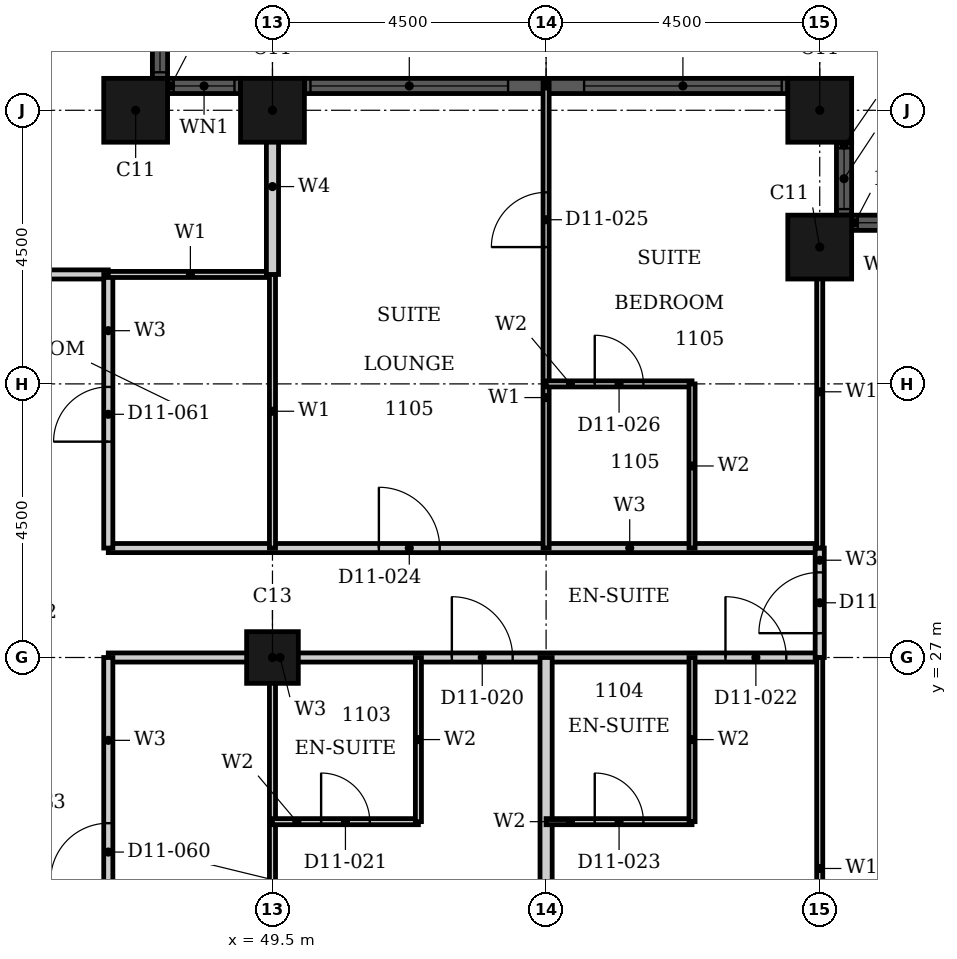
"""IFC4 building model, lengths in metres.
Left out: names, types, materials, properties, quantities, classifications, styles, units other than length and angle.
Written with IfcOpenShell. Run it as: python <this file> out.ifc"""

import sys

from ifc_helpers import new_model, si_unit, direction, frame, frame_2d, origin, origin_2d, place, context, subcontext, project, spatial, rectangle, hollow_rectangle, extrude, element, fill, save


model = new_model("IFC4")
c1 = context("Model", 3, precision=1e-05, world=origin(), true_north=direction((0.0, 1.0)))
c2 = subcontext(c1, "Body", "Model", "MODEL_VIEW")
j1 = project(units=[si_unit("LENGTHUNIT", "METRE"), si_unit("PLANEANGLEUNIT", "RADIAN")], contexts=[c1])
p1 = place(None, origin())
s1 = spatial("IfcSite", under=j1, at=p1, CompositionType="ELEMENT")
p2 = place(p1, origin())
s2 = spatial("IfcBuilding", under=s1, at=p2, CompositionType="ELEMENT")
p3 = place(p2, frame((0.0, 0.0, 52.8)))
s3 = spatial("IfcBuildingStorey", under=s2, at=p3, CompositionType="ELEMENT", Elevation=52.8)
for number, where, z_axis, x_axis in (
    (1, (58.5, 33.75, 0.0), (0.0, 0.0, 1.0), (1.0, 0.0, 0.0)),
    (2, (58.5, 36.0, 0.0), (0.0, 0.0, 1.0), (1.0, 0.0, 0.0)),
    (3, (49.5, 36.0, 0.0), (0.0, 0.0, 1.0), (1.0, 0.0, 0.0)),
    (4, (47.25, 36.0, 0.0), (0.0, 0.0, 1.0), (1.0, 0.0, 0.0)),
):
    element("IfcColumn", number, at=place(p3, frame(where, z_axis=z_axis, x_axis=x_axis)), inside=s3, PredefinedType="COLUMN", context=c2, shape_type="SweptSolid", body=[
        extrude(hollow_rectangle(XDim=1.05, YDim=1.05, WallThickness=0.034, at=origin_2d()), origin(), (0.0, 0.0, 1.0), 3.6),
    ])
p4 = place(p3, frame((49.5, 27.0, 0.0), z_axis=(0.0, 0.0, 1.0), x_axis=(1.0, 0.0, 0.0)))
e5 = element("IfcColumn", 5, at=p4, inside=s3, PredefinedType="COLUMN", context=c2, shape_type="SweptSolid", body=[
    extrude(hollow_rectangle(XDim=0.85, YDim=0.85, WallThickness=0.026, at=origin_2d()), origin(), (0.0, 0.0, 1.0), 3.6),
])
p5 = place(p3, frame((60.225, 34.15, 0.0), z_axis=(0.0, 0.0, 1.0), x_axis=(-1.0, 0.0, 0.0)))
e6 = element("IfcWall", 6, at=p5, inside=s3, PredefinedType="SOLIDWALL", context=c2, shape_type="SweptSolid", body=[
    extrude(rectangle(XDim=1.2, YDim=0.25, at=frame_2d((0.6, 0.0))), origin(), (0.0, 0.0, 1.0), 3.6),
])
p6 = place(p5, frame((0.1, 0.0, 0.9)))
e7 = element("IfcOpeningElement", 7, at=p6, cuts=e6, PredefinedType="OPENING", context=c2, shape_type="SweptSolid", body=[
    extrude(rectangle(XDim=1.0, YDim=2.08, at=frame_2d((0.5, 1.04))), frame((0.0, 0.135, 0.0), z_axis=(0.0, -1.0, 0.0), x_axis=(1.0, 0.0, 0.0)), (0.0, 0.0, 1.0), 0.27),
])
p7 = place(p3, frame((58.9, 34.275, 0.0), z_axis=(0.0, 0.0, 1.0), x_axis=(0.0, 1.0, 0.0)))
e8 = element("IfcWall", 8, at=p7, inside=s3, PredefinedType="SOLIDWALL", context=c2, shape_type="SweptSolid", body=[
    extrude(rectangle(XDim=1.2, YDim=0.25, at=frame_2d((0.6, 0.0))), origin(), (0.0, 0.0, 1.0), 3.6),
])
p8 = place(p7, frame((0.1, 0.0, 0.9)))
e9 = element("IfcOpeningElement", 9, at=p8, cuts=e8, PredefinedType="OPENING", context=c2, shape_type="SweptSolid", body=[
    extrude(rectangle(XDim=1.0, YDim=2.08, at=frame_2d((0.5, 1.04))), frame((0.0, 0.135, 0.0), z_axis=(0.0, -1.0, 0.0), x_axis=(1.0, 0.0, 0.0)), (0.0, 0.0, 1.0), 0.27),
])
p9 = place(p3, frame((57.975, 36.4, 0.0), z_axis=(0.0, 0.0, 1.0), x_axis=(-1.0, 0.0, 0.0)))
e10 = element("IfcWall", 10, at=p9, inside=s3, PredefinedType="SOLIDWALL", context=c2, shape_type="SweptSolid", body=[
    extrude(rectangle(XDim=7.95, YDim=0.25, at=frame_2d((3.975, 0.0))), origin(), (0.0, 0.0, 1.0), 3.6),
])
p10 = place(p9, frame((0.1, 0.0, 0.9)))
e11 = element("IfcOpeningElement", 11, at=p10, cuts=e10, PredefinedType="OPENING", context=c2, shape_type="SweptSolid", body=[
    extrude(rectangle(XDim=3.25, YDim=2.08, at=frame_2d((1.625, 1.04))), frame((0.0, 0.135, 0.0), z_axis=(0.0, -1.0, 0.0), x_axis=(1.0, 0.0, 0.0)), (0.0, 0.0, 1.0), 0.27),
])
p11 = place(p9, frame((4.6, 0.0, 0.9)))
e12 = element("IfcOpeningElement", 12, at=p11, cuts=e10, PredefinedType="OPENING", context=c2, shape_type="SweptSolid", body=[
    extrude(rectangle(XDim=3.25, YDim=2.08, at=frame_2d((1.625, 1.04))), frame((0.0, 0.135, 0.0), z_axis=(0.0, -1.0, 0.0), x_axis=(1.0, 0.0, 0.0)), (0.0, 0.0, 1.0), 0.27),
])
p12 = place(p3, frame((48.975, 36.4, 0.0), z_axis=(0.0, 0.0, 1.0), x_axis=(-1.0, 0.0, 0.0)))
e13 = element("IfcWall", 13, at=p12, inside=s3, PredefinedType="SOLIDWALL", context=c2, shape_type="SweptSolid", body=[
    extrude(rectangle(XDim=1.2, YDim=0.25, at=frame_2d((0.6, 0.0))), origin(), (0.0, 0.0, 1.0), 3.6),
])
p13 = place(p12, frame((0.1, 0.0, 0.9)))
e14 = element("IfcOpeningElement", 14, at=p13, cuts=e13, PredefinedType="OPENING", context=c2, shape_type="SweptSolid", body=[
    extrude(rectangle(XDim=1.0, YDim=2.08, at=frame_2d((0.5, 1.04))), frame((0.0, 0.135, 0.0), z_axis=(0.0, -1.0, 0.0), x_axis=(1.0, 0.0, 0.0)), (0.0, 0.0, 1.0), 0.27),
])
p14 = place(p3, frame((47.65, 36.525, 0.0), z_axis=(0.0, 0.0, 1.0), x_axis=(0.0, 1.0, 0.0)))
e15 = element("IfcWall", 15, at=p14, inside=s3, PredefinedType="SOLIDWALL", context=c2, shape_type="SweptSolid", body=[
    extrude(rectangle(XDim=1.2, YDim=0.25, at=frame_2d((0.6, 0.0))), origin(), (0.0, 0.0, 1.0), 3.6),
])
p15 = place(p14, frame((0.1, 0.0, 0.9)))
e16 = element("IfcOpeningElement", 16, at=p15, cuts=e15, PredefinedType="OPENING", context=c2, shape_type="SweptSolid", body=[
    extrude(rectangle(XDim=1.0, YDim=2.08, at=frame_2d((0.5, 1.04))), frame((0.0, 0.135, 0.0), z_axis=(0.0, -1.0, 0.0), x_axis=(1.0, 0.0, 0.0)), (0.0, 0.0, 1.0), 0.27),
])
p16 = place(p3, frame((46.8, 27.0, 0.0), z_axis=(0.0, 0.0, 1.0), x_axis=(1.0, 0.0, 0.0)))
e17 = element("IfcWall", 17, at=p16, inside=s3, PredefinedType="PARTITIONING", context=c2, shape_type="SweptSolid", body=[
    extrude(rectangle(XDim=11.7, YDim=0.15, at=frame_2d((5.85, 0.0))), origin(), (0.0, 0.0, 1.0), 2.58),
])
p17 = place(p16, frame((5.65, 0.0, 0.0)))
e18 = element("IfcOpeningElement", 18, at=p17, cuts=e17, PredefinedType="OPENING", context=c2, shape_type="SweptSolid", body=[
    extrude(rectangle(XDim=1.0, YDim=2.1, at=frame_2d((0.5, 1.05))), frame((0.0, 0.085, 0.0), z_axis=(0.0, -1.0, 0.0), x_axis=(1.0, 0.0, 0.0)), (0.0, 0.0, 1.0), 0.17),
])
p18 = place(p16, frame((10.15, 0.0, 0.0)))
e19 = element("IfcOpeningElement", 19, at=p18, cuts=e17, PredefinedType="OPENING", context=c2, shape_type="SweptSolid", body=[
    extrude(rectangle(XDim=1.0, YDim=2.1, at=frame_2d((0.5, 1.05))), frame((0.0, 0.085, 0.0), z_axis=(0.0, -1.0, 0.0), x_axis=(1.0, 0.0, 0.0)), (0.0, 0.0, 1.0), 0.17),
])
p19 = place(p3, frame((46.8, 28.8, 0.0), z_axis=(0.0, 0.0, 1.0), x_axis=(1.0, 0.0, 0.0)))
e20 = element("IfcWall", 20, at=p19, inside=s3, PredefinedType="PARTITIONING", context=c2, shape_type="SweptSolid", body=[
    extrude(rectangle(XDim=11.7, YDim=0.15, at=frame_2d((5.85, 0.0))), origin(), (0.0, 0.0, 1.0), 3.3),
])
p20 = place(p19, frame((4.45, 0.0, 0.0)))
e21 = element("IfcOpeningElement", 21, at=p20, cuts=e20, PredefinedType="OPENING", context=c2, shape_type="SweptSolid", body=[
    extrude(rectangle(XDim=1.0, YDim=2.1, at=frame_2d((0.5, 1.05))), frame((0.0, 0.085, 0.0), z_axis=(0.0, -1.0, 0.0), x_axis=(1.0, 0.0, 0.0)), (0.0, 0.0, 1.0), 0.17),
])
p21 = place(p3, frame((33.3, 33.3, 0.0), z_axis=(0.0, 0.0, 1.0), x_axis=(1.0, 0.0, 0.0)))
e22 = element("IfcWall", 22, at=p21, inside=s3, PredefinedType="PARTITIONING", context=c2, shape_type="SweptSolid", body=[
    extrude(rectangle(XDim=13.5, YDim=0.15, at=frame_2d((6.75, 0.0))), origin(), (0.0, 0.0, 1.0), 3.3),
])
p22 = place(p21, frame((10.15, 0.0, 0.0)))
e23 = element("IfcOpeningElement", 23, at=p22, cuts=e22, PredefinedType="OPENING", context=c2, shape_type="SweptSolid", body=[
    extrude(rectangle(XDim=1.0, YDim=2.1, at=frame_2d((0.5, 1.05))), frame((0.0, 0.085, 0.0), z_axis=(0.0, -1.0, 0.0), x_axis=(1.0, 0.0, 0.0)), (0.0, 0.0, 1.0), 0.17),
])
p23 = place(p21, frame((3.15, 0.0, 0.0)))
e24 = element("IfcOpeningElement", 24, at=p23, cuts=e22, PredefinedType="OPENING", context=c2, shape_type="SweptSolid", body=[
    extrude(rectangle(XDim=0.9, YDim=2.1, at=frame_2d((0.45, 1.05))), frame((0.0, 0.085, 0.0), z_axis=(0.0, -1.0, 0.0), x_axis=(1.0, 0.0, 0.0)), (0.0, 0.0, 1.0), 0.17),
])
p24 = place(p3, frame((46.8, 28.8, 0.0), z_axis=(0.0, 0.0, 1.0), x_axis=(0.0, 1.0, 0.0)))
e25 = element("IfcWall", 25, at=p24, inside=s3, PredefinedType="PARTITIONING", context=c2, shape_type="SweptSolid", body=[
    extrude(rectangle(XDim=4.5, YDim=0.15, at=frame_2d((2.25, 0.0))), origin(), (0.0, 0.0, 1.0), 3.3),
])
p25 = place(p24, frame((1.75, 0.0, 0.0)))
e26 = element("IfcOpeningElement", 26, at=p25, cuts=e25, PredefinedType="OPENING", context=c2, shape_type="SweptSolid", body=[
    extrude(rectangle(XDim=0.9, YDim=2.1, at=frame_2d((0.45, 1.05))), frame((0.0, 0.085, 0.0), z_axis=(0.0, -1.0, 0.0), x_axis=(1.0, 0.0, 0.0)), (0.0, 0.0, 1.0), 0.17),
])
p26 = place(p3, frame((46.8, 20.7, 0.0), z_axis=(0.0, 0.0, 1.0), x_axis=(0.0, 1.0, 0.0)))
e27 = element("IfcWall", 27, at=p26, inside=s3, PredefinedType="PARTITIONING", context=c2, shape_type="SweptSolid", body=[
    extrude(rectangle(XDim=6.3, YDim=0.15, at=frame_2d((3.15, 0.0))), origin(), (0.0, 0.0, 1.0), 3.3),
])
p27 = place(p26, frame((2.625, 0.0, 0.0)))
e28 = element("IfcOpeningElement", 28, at=p27, cuts=e27, PredefinedType="OPENING", context=c2, shape_type="SweptSolid", body=[
    extrude(rectangle(XDim=0.95, YDim=2.1, at=frame_2d((0.475, 1.05))), frame((0.0, 0.085, 0.0), z_axis=(0.0, -1.0, 0.0), x_axis=(1.0, 0.0, 0.0)), (0.0, 0.0, 1.0), 0.17),
])
p28 = place(p3, frame((58.5, 27.0, 0.0), z_axis=(0.0, 0.0, 1.0), x_axis=(0.0, 1.0, 0.0)))
e29 = element("IfcWall", 29, at=p28, inside=s3, PredefinedType="PARTITIONING", context=c2, shape_type="SweptSolid", body=[
    extrude(rectangle(XDim=1.8, YDim=0.15, at=frame_2d((0.9, 0.0))), origin(), (0.0, 0.0, 1.0), 3.3),
])
p29 = place(p28, frame((0.4, 0.0, 0.0)))
e30 = element("IfcOpeningElement", 30, at=p29, cuts=e29, PredefinedType="OPENING", context=c2, shape_type="SweptSolid", body=[
    extrude(rectangle(XDim=1.0, YDim=2.1, at=frame_2d((0.5, 1.05))), frame((0.0, 0.085, 0.0), z_axis=(0.0, -1.0, 0.0), x_axis=(1.0, 0.0, 0.0)), (0.0, 0.0, 1.0), 0.17),
])
p30 = place(p3, frame((46.8, 33.3, 0.0), z_axis=(0.0, 0.0, 1.0), x_axis=(1.0, 0.0, 0.0)))
e31 = element("IfcWall", 31, at=p30, inside=s3, PredefinedType="PARTITIONING", context=c2, shape_type="SweptSolid", body=[
    extrude(rectangle(XDim=2.7, YDim=0.1, at=frame_2d((1.35, 0.0))), origin(), (0.0, 0.0, 1.0), 3.3),
])
p31 = place(p3, frame((49.5, 17.81, 0.0), z_axis=(0.0, 0.0, 1.0), x_axis=(0.0, 1.0, 0.0)))
e32 = element("IfcWall", 32, at=p31, inside=s3, PredefinedType="PARTITIONING", context=c2, shape_type="SweptSolid", body=[
    extrude(rectangle(XDim=9.19, YDim=0.1, at=frame_2d((4.595, 0.0))), origin(), (0.0, 0.0, 1.0), 2.38),
])
p32 = place(p3, frame((49.5, 28.8, 0.0), z_axis=(0.0, 0.0, 1.0), x_axis=(0.0, 1.0, 0.0)))
e33 = element("IfcWall", 33, at=p32, inside=s3, PredefinedType="PARTITIONING", context=c2, shape_type="SweptSolid", body=[
    extrude(rectangle(XDim=4.5, YDim=0.1, at=frame_2d((2.25, 0.0))), origin(), (0.0, 0.0, 1.0), 2.38),
])
p33 = place(p3, frame((54.0, 28.8, 0.0), z_axis=(0.0, 0.0, 1.0), x_axis=(0.0, 1.0, 0.0)))
e34 = element("IfcWall", 34, at=p33, inside=s3, PredefinedType="PARTITIONING", context=c2, shape_type="SweptSolid", body=[
    extrude(rectangle(XDim=7.665, YDim=0.1, at=frame_2d((3.833, 0.0))), origin(), (0.0, 0.0, 1.0), 3.3),
])
p34 = place(p33, frame((4.95, 0.0, 0.0)))
e35 = element("IfcOpeningElement", 35, at=p34, cuts=e34, PredefinedType="OPENING", context=c2, shape_type="SweptSolid", body=[
    extrude(rectangle(XDim=0.9, YDim=2.1, at=frame_2d((0.45, 1.05))), frame((0.0, 0.06, 0.0), z_axis=(0.0, -1.0, 0.0), x_axis=(1.0, 0.0, 0.0)), (0.0, 0.0, 1.0), 0.12),
])
p35 = place(p3, frame((58.5, 20.06, 0.0), z_axis=(0.0, 0.0, 1.0), x_axis=(0.0, 1.0, 0.0)))
e36 = element("IfcWall", 36, at=p35, inside=s3, PredefinedType="PARTITIONING", context=c2, shape_type="SweptSolid", body=[
    extrude(rectangle(XDim=6.94, YDim=0.1, at=frame_2d((3.47, 0.0))), origin(), (0.0, 0.0, 1.0), 3.3),
])
p36 = place(p3, frame((58.5, 28.8, 0.0), z_axis=(0.0, 0.0, 1.0), x_axis=(0.0, 1.0, 0.0)))
e37 = element("IfcWall", 37, at=p36, inside=s3, PredefinedType="PARTITIONING", context=c2, shape_type="SweptSolid", body=[
    extrude(rectangle(XDim=5.14, YDim=0.1, at=frame_2d((2.57, 0.0))), origin(), (0.0, 0.0, 1.0), 3.3),
])
p37 = place(p3, frame((49.5, 33.3, 0.0), z_axis=(0.0, 0.0, 1.0), x_axis=(0.0, 1.0, 0.0)))
e38 = element("IfcWall", 38, at=p37, inside=s3, PredefinedType="PARTITIONING", context=c2, shape_type="SweptSolid", body=[
    extrude(rectangle(XDim=2.89, YDim=0.2, at=frame_2d((1.445, 0.0))), origin(), (0.0, 0.0, 1.0), 2.38),
])
p38 = place(p3, frame((54.0, 17.535, 0.0), z_axis=(0.0, 0.0, 1.0), x_axis=(0.0, 1.0, 0.0)))
e39 = element("IfcWall", 39, at=p38, inside=s3, PredefinedType="PARTITIONING", context=c2, shape_type="SweptSolid", body=[
    extrude(rectangle(XDim=9.465, YDim=0.2, at=frame_2d((4.732, 0.0))), origin(), (0.0, 0.0, 1.0), 3.3),
])
p39 = place(p3, frame((49.5, 24.3, 0.0), z_axis=(0.0, 0.0, 1.0), x_axis=(1.0, 0.0, 0.0)))
e40 = element("IfcWall", 40, at=p39, inside=s3, PredefinedType="PARTITIONING", context=c2, shape_type="SweptSolid", body=[
    extrude(rectangle(XDim=2.4, YDim=0.1, at=frame_2d((1.2, 0.0))), origin(), (0.0, 0.0, 1.0), 3.3),
])
p40 = place(p39, frame((0.8, 0.0, 0.0)))
e41 = element("IfcOpeningElement", 41, at=p40, cuts=e40, PredefinedType="OPENING", context=c2, shape_type="SweptSolid", body=[
    extrude(rectangle(XDim=0.8, YDim=2.1, at=frame_2d((0.4, 1.05))), frame((0.0, 0.06, 0.0), z_axis=(0.0, -1.0, 0.0), x_axis=(1.0, 0.0, 0.0)), (0.0, 0.0, 1.0), 0.12),
])
p41 = place(p3, frame((54.0, 24.3, 0.0), z_axis=(0.0, 0.0, 1.0), x_axis=(1.0, 0.0, 0.0)))
e42 = element("IfcWall", 42, at=p41, inside=s3, PredefinedType="PARTITIONING", context=c2, shape_type="SweptSolid", body=[
    extrude(rectangle(XDim=2.4, YDim=0.1, at=frame_2d((1.2, 0.0))), origin(), (0.0, 0.0, 1.0), 3.3),
])
p42 = place(p41, frame((0.8, 0.0, 0.0)))
e43 = element("IfcOpeningElement", 43, at=p42, cuts=e42, PredefinedType="OPENING", context=c2, shape_type="SweptSolid", body=[
    extrude(rectangle(XDim=0.8, YDim=2.1, at=frame_2d((0.4, 1.05))), frame((0.0, 0.06, 0.0), z_axis=(0.0, -1.0, 0.0), x_axis=(1.0, 0.0, 0.0)), (0.0, 0.0, 1.0), 0.12),
])
p43 = place(p3, frame((54.0, 31.5, 0.0), z_axis=(0.0, 0.0, 1.0), x_axis=(1.0, 0.0, 0.0)))
e44 = element("IfcWall", 44, at=p43, inside=s3, PredefinedType="PARTITIONING", context=c2, shape_type="SweptSolid", body=[
    extrude(rectangle(XDim=2.4, YDim=0.1, at=frame_2d((1.2, 0.0))), origin(), (0.0, 0.0, 1.0), 2.58),
])
p44 = place(p43, frame((0.8, 0.0, 0.0)))
e45 = element("IfcOpeningElement", 45, at=p44, cuts=e44, PredefinedType="OPENING", context=c2, shape_type="SweptSolid", body=[
    extrude(rectangle(XDim=0.8, YDim=2.1, at=frame_2d((0.4, 1.05))), frame((0.0, 0.06, 0.0), z_axis=(0.0, -1.0, 0.0), x_axis=(1.0, 0.0, 0.0)), (0.0, 0.0, 1.0), 0.12),
])
for number, where, z_axis, x_axis in (
    (46, (51.9, 24.3, 0.0), (0.0, 0.0, 1.0), (0.0, 1.0, 0.0)),
    (47, (56.4, 24.3, 0.0), (0.0, 0.0, 1.0), (0.0, 1.0, 0.0)),
    (48, (56.4, 28.8, 0.0), (0.0, 0.0, 1.0), (0.0, 1.0, 0.0)),
):
    element("IfcWall", number, at=place(p3, frame(where, z_axis=z_axis, x_axis=x_axis)), inside=s3, PredefinedType="PARTITIONING", context=c2, shape_type="SweptSolid", body=[
        extrude(rectangle(XDim=2.7, YDim=0.1, at=frame_2d((1.35, 0.0))), origin(), (0.0, 0.0, 1.0), 3.3),
    ])
p45 = place(p6, origin())
e49 = element("IfcWindow", 49, at=p45, inside=s3, PartitioningType="SINGLE_PANEL", PredefinedType="WINDOW", context=c2, shape_type="SweptSolid", body=[
    extrude(rectangle(XDim=1.0, YDim=2.08, at=frame_2d((0.5, 1.04))), frame((0.0, 0.03, 0.0), z_axis=(0.0, -1.0, 0.0), x_axis=(1.0, 0.0, 0.0)), (0.0, 0.0, 1.0), 0.06),
])
fill(e7, e49)
p46 = place(p8, origin())
e50 = element("IfcWindow", 50, at=p46, inside=s3, PartitioningType="SINGLE_PANEL", PredefinedType="WINDOW", context=c2, shape_type="SweptSolid", body=[
    extrude(rectangle(XDim=1.0, YDim=2.08, at=frame_2d((0.5, 1.04))), frame((0.0, 0.03, 0.0), z_axis=(0.0, -1.0, 0.0), x_axis=(1.0, 0.0, 0.0)), (0.0, 0.0, 1.0), 0.06),
])
fill(e9, e50)
p47 = place(p10, origin())
e51 = element("IfcWindow", 51, at=p47, inside=s3, PartitioningType="SINGLE_PANEL", PredefinedType="WINDOW", context=c2, shape_type="SweptSolid", body=[
    extrude(rectangle(XDim=3.25, YDim=2.08, at=frame_2d((1.625, 1.04))), frame((0.0, 0.03, 0.0), z_axis=(0.0, -1.0, 0.0), x_axis=(1.0, 0.0, 0.0)), (0.0, 0.0, 1.0), 0.06),
])
fill(e11, e51)
p48 = place(p11, origin())
e52 = element("IfcWindow", 52, at=p48, inside=s3, PartitioningType="SINGLE_PANEL", PredefinedType="WINDOW", context=c2, shape_type="SweptSolid", body=[
    extrude(rectangle(XDim=3.25, YDim=2.08, at=frame_2d((1.625, 1.04))), frame((0.0, 0.03, 0.0), z_axis=(0.0, -1.0, 0.0), x_axis=(1.0, 0.0, 0.0)), (0.0, 0.0, 1.0), 0.06),
])
fill(e12, e52)
p49 = place(p13, origin())
e53 = element("IfcWindow", 53, at=p49, inside=s3, PartitioningType="SINGLE_PANEL", PredefinedType="WINDOW", context=c2, shape_type="SweptSolid", body=[
    extrude(rectangle(XDim=1.0, YDim=2.08, at=frame_2d((0.5, 1.04))), frame((0.0, 0.03, 0.0), z_axis=(0.0, -1.0, 0.0), x_axis=(1.0, 0.0, 0.0)), (0.0, 0.0, 1.0), 0.06),
])
fill(e14, e53)
p50 = place(p15, origin())
e54 = element("IfcWindow", 54, at=p50, inside=s3, PartitioningType="SINGLE_PANEL", PredefinedType="WINDOW", context=c2, shape_type="SweptSolid", body=[
    extrude(rectangle(XDim=1.0, YDim=2.08, at=frame_2d((0.5, 1.04))), frame((0.0, 0.03, 0.0), z_axis=(0.0, -1.0, 0.0), x_axis=(1.0, 0.0, 0.0)), (0.0, 0.0, 1.0), 0.06),
])
fill(e16, e54)
p51 = place(p17, origin())
e55 = element("IfcDoor", 55, at=p51, inside=s3, OperationType="SINGLE_SWING_RIGHT", PredefinedType="DOOR", context=c2, shape_type="SweptSolid", body=[
    extrude(rectangle(XDim=1.0, YDim=2.1, at=frame_2d((0.5, 1.05))), frame((0.0, 0.025, 0.0), z_axis=(0.0, -1.0, 0.0), x_axis=(1.0, 0.0, 0.0)), (0.0, 0.0, 1.0), 0.05),
])
fill(e18, e55)
p52 = place(p40, origin())
e56 = element("IfcDoor", 56, at=p52, inside=s3, OperationType="SINGLE_SWING_RIGHT", PredefinedType="DOOR", context=c2, shape_type="SweptSolid", body=[
    extrude(rectangle(XDim=0.8, YDim=2.1, at=frame_2d((0.4, 1.05))), frame((0.0, 0.025, 0.0), z_axis=(0.0, -1.0, 0.0), x_axis=(1.0, 0.0, 0.0)), (0.0, 0.0, 1.0), 0.05),
])
fill(e41, e56)
p53 = place(p18, origin())
e57 = element("IfcDoor", 57, at=p53, inside=s3, OperationType="SINGLE_SWING_RIGHT", PredefinedType="DOOR", context=c2, shape_type="SweptSolid", body=[
    extrude(rectangle(XDim=1.0, YDim=2.1, at=frame_2d((0.5, 1.05))), frame((0.0, 0.025, 0.0), z_axis=(0.0, -1.0, 0.0), x_axis=(1.0, 0.0, 0.0)), (0.0, 0.0, 1.0), 0.05),
])
fill(e19, e57)
p54 = place(p42, origin())
e58 = element("IfcDoor", 58, at=p54, inside=s3, OperationType="SINGLE_SWING_LEFT", PredefinedType="DOOR", context=c2, shape_type="SweptSolid", body=[
    extrude(rectangle(XDim=0.8, YDim=2.1, at=frame_2d((0.4, 1.05))), frame((0.0, 0.025, 0.0), z_axis=(0.0, -1.0, 0.0), x_axis=(1.0, 0.0, 0.0)), (0.0, 0.0, 1.0), 0.05),
])
fill(e43, e58)
p55 = place(p20, origin())
e59 = element("IfcDoor", 59, at=p55, inside=s3, OperationType="SINGLE_SWING_LEFT", PredefinedType="DOOR", context=c2, shape_type="SweptSolid", body=[
    extrude(rectangle(XDim=1.0, YDim=2.1, at=frame_2d((0.5, 1.05))), frame((0.0, 0.025, 0.0), z_axis=(0.0, -1.0, 0.0), x_axis=(1.0, 0.0, 0.0)), (0.0, 0.0, 1.0), 0.05),
])
fill(e21, e59)
p56 = place(p34, origin())
e60 = element("IfcDoor", 60, at=p56, inside=s3, OperationType="SINGLE_SWING_RIGHT", PredefinedType="DOOR", context=c2, shape_type="SweptSolid", body=[
    extrude(rectangle(XDim=0.9, YDim=2.1, at=frame_2d((0.45, 1.05))), frame((0.0, 0.025, 0.0), z_axis=(0.0, -1.0, 0.0), x_axis=(1.0, 0.0, 0.0)), (0.0, 0.0, 1.0), 0.05),
])
fill(e35, e60)
p57 = place(p44, origin())
e61 = element("IfcDoor", 61, at=p57, inside=s3, OperationType="SINGLE_SWING_LEFT", PredefinedType="DOOR", context=c2, shape_type="SweptSolid", body=[
    extrude(rectangle(XDim=0.8, YDim=2.1, at=frame_2d((0.4, 1.05))), frame((0.0, 0.025, 0.0), z_axis=(0.0, -1.0, 0.0), x_axis=(1.0, 0.0, 0.0)), (0.0, 0.0, 1.0), 0.05),
])
fill(e45, e61)
p58 = place(p29, origin())
e62 = element("IfcDoor", 62, at=p58, inside=s3, OperationType="SINGLE_SWING_LEFT", PredefinedType="DOOR", context=c2, shape_type="SweptSolid", body=[
    extrude(rectangle(XDim=1.0, YDim=2.1, at=frame_2d((0.5, 1.05))), frame((0.0, 0.025, 0.0), z_axis=(0.0, -1.0, 0.0), x_axis=(1.0, 0.0, 0.0)), (0.0, 0.0, 1.0), 0.05),
])
fill(e30, e62)
p59 = place(p27, origin())
e63 = element("IfcDoor", 63, at=p59, inside=s3, OperationType="SINGLE_SWING_RIGHT", PredefinedType="DOOR", context=c2, shape_type="SweptSolid", body=[
    extrude(rectangle(XDim=0.95, YDim=2.1, at=frame_2d((0.475, 1.05))), frame((0.0, 0.025, 0.0), z_axis=(0.0, -1.0, 0.0), x_axis=(1.0, 0.0, 0.0)), (0.0, 0.0, 1.0), 0.05),
])
fill(e28, e63)
p60 = place(p25, origin())
e64 = element("IfcDoor", 64, at=p60, inside=s3, OperationType="SINGLE_SWING_LEFT", PredefinedType="DOOR", context=c2, shape_type="SweptSolid", body=[
    extrude(rectangle(XDim=0.9, YDim=2.1, at=frame_2d((0.45, 1.05))), frame((0.0, 0.025, 0.0), z_axis=(0.0, -1.0, 0.0), x_axis=(1.0, 0.0, 0.0)), (0.0, 0.0, 1.0), 0.05),
])
fill(e26, e64)
save(model, sys.argv[1])
